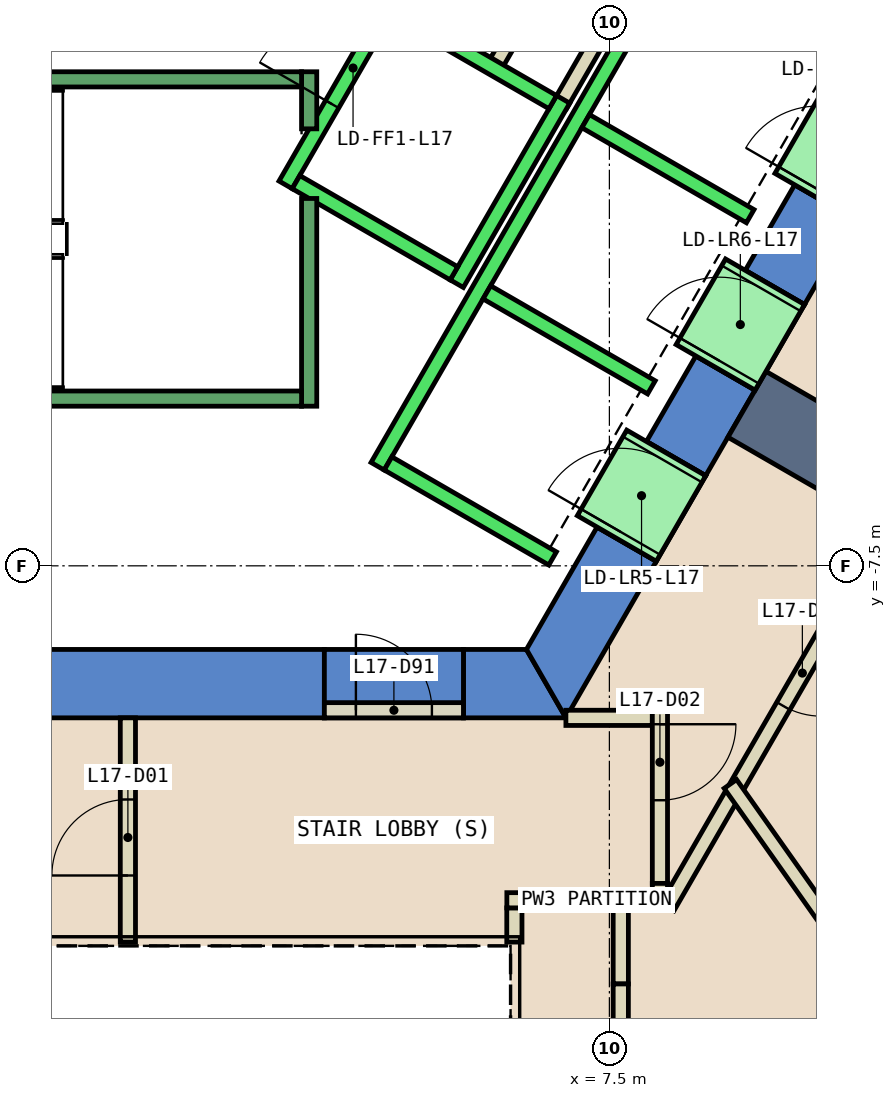
"""IFC4 building model, lengths in metres.
Left out: names, types, materials, properties, quantities, classifications, styles, units other than length and angle.
Written with IfcOpenShell. Run it as: python <this file> out.ifc"""

import sys

from ifc_helpers import new_model, si_unit, direction, frame, frame_2d, origin, place, context, subcontext, project, spatial, polyline, rectangle, outline, extrude, element, fill, save


model = new_model("IFC4")
c1 = context("Model", 3, precision=1e-05, world=origin(), true_north=direction((0.0, 1.0)))
c2 = subcontext(c1, "Body", "Model", "MODEL_VIEW")
j1 = project(units=[si_unit("LENGTHUNIT", "METRE"), si_unit("PLANEANGLEUNIT", "RADIAN")], contexts=[c1])
p1 = place(None, origin())
s1 = spatial("IfcSite", under=j1, at=p1, CompositionType="ELEMENT")
p2 = place(p1, origin())
s2 = spatial("IfcBuilding", under=s1, at=p2, CompositionType="ELEMENT")
p3 = place(p2, frame((0.0, 0.0, 81.2)))
s3 = spatial("IfcBuildingStorey", under=s2, at=p3, CompositionType="ELEMENT", Elevation=81.2)
p4 = place(p3, frame((0.0, 0.0, -0.6)))
e1 = element("IfcWall", 1, at=p4, inside=s3, PredefinedType="SHEAR", context=c2, shape_type="SweptSolid", body=[
    extrude(outline(polyline([(3.75, -9.5), (3.75, -8.6), (-6.409, -8.6), (-6.928, -9.5), (3.75, -9.5)])), origin(), (0.0, 0.0, 1.0), 5.4),
])
p5 = place(p3, frame((0.0, 0.0, -0.6)))
e2 = element("IfcWall", 2, at=p5, inside=s3, PredefinedType="SHEAR", context=c2, shape_type="SweptSolid", body=[
    extrude(outline(polyline([(5.58, -8.6), (5.58, -9.5), (6.928, -9.5), (6.409, -8.6), (5.58, -8.6)])), origin(), (0.0, 0.0, 1.0), 5.4),
])
p6 = place(p3, frame((0.0, 0.0, 3.6)))
e3 = element("IfcWall", 3, at=p6, inside=s3, PredefinedType="SHEAR", context=c2, shape_type="SweptSolid", body=[
    extrude(outline(polyline([(5.58, -9.5), (5.58, -8.6), (3.75, -8.6), (3.75, -9.5), (5.58, -9.5)])), origin(), (0.0, 0.0, 1.0), 1.2),
])
p7 = place(p3, frame((0.0, 0.0, -0.6)))
e4 = element("IfcWall", 4, at=p7, inside=s3, PredefinedType="SHEAR", context=c2, shape_type="SweptSolid", body=[
    extrude(outline(polyline([(8.117, -7.44), (7.338, -6.99), (6.409, -8.6), (6.928, -9.5), (8.117, -7.44)])), origin(), (0.0, 0.0, 1.0), 5.4),
])
p8 = place(p3, frame((0.0, 0.0, -0.6)))
e5 = element("IfcWall", 5, at=p8, inside=s3, PredefinedType="SHEAR", context=c2, shape_type="SweptSolid", body=[
    extrude(outline(polyline([(9.417, -5.189), (8.638, -4.739), (7.988, -5.864), (8.767, -6.314), (9.417, -5.189)])), origin(), (0.0, 0.0, 1.0), 5.4),
])
p9 = place(p3, frame((0.0, 0.0, -0.6)))
e6 = element("IfcWall", 6, at=p9, inside=s3, PredefinedType="SHEAR", context=c2, shape_type="SweptSolid", body=[
    extrude(outline(polyline([(10.717, -2.937), (9.938, -2.487), (9.288, -3.613), (10.067, -4.063), (10.717, -2.937)])), origin(), (0.0, 0.0, 1.0), 5.4),
])
p10 = place(p3, frame((0.0, 0.0, 3.6)))
e7 = element("IfcWall", 7, at=p10, inside=s3, PredefinedType="SHEAR", context=c2, shape_type="SweptSolid", body=[
    extrude(outline(polyline([(8.767, -6.314), (7.988, -5.864), (7.338, -6.99), (8.117, -7.44), (8.767, -6.314)])), origin(), (0.0, 0.0, 1.0), 1.2),
])
p11 = place(p3, frame((0.0, 0.0, 3.6)))
e8 = element("IfcWall", 8, at=p11, inside=s3, PredefinedType="SHEAR", context=c2, shape_type="SweptSolid", body=[
    extrude(outline(polyline([(10.067, -4.063), (9.288, -3.613), (8.638, -4.739), (9.417, -5.189), (10.067, -4.063)])), origin(), (0.0, 0.0, 1.0), 1.2),
])
p12 = place(p3, frame((0.0, 0.0, 3.6)))
e9 = element("IfcWall", 9, at=p12, inside=s3, PredefinedType="SHEAR", context=c2, shape_type="SweptSolid", body=[
    extrude(outline(polyline([(11.367, -1.811), (10.588, -1.361), (9.938, -2.487), (10.717, -2.937), (11.367, -1.811)])), origin(), (0.0, 0.0, 1.0), 1.2),
])
p13 = place(p3, frame((9.31, -5.375, 0.0), z_axis=(0.0, 0.0, 1.0), x_axis=(0.866022967049, -0.500004220526, 0.0)))
e10 = element("IfcWall", 10, at=p13, inside=s3, PredefinedType="SHEAR", context=c2, shape_type="SweptSolid", body=[
    extrude(rectangle(XDim=35.802, YDim=1.0, at=frame_2d((17.901, 0.0))), origin(), (0.0, 0.0, 1.0), 4.8),
])
p14 = place(p3, frame((6.826, 0.522, 0.0), z_axis=(0.0, 0.0, 1.0), x_axis=(-0.500016722714, -0.866015748706, 0.0)))
e11 = element("IfcWall", 11, at=p14, inside=s3, PredefinedType="PARTITIONING", context=c2, shape_type="SweptSolid", body=[
    extrude(rectangle(XDim=1.7, YDim=0.2, at=frame_2d((0.85, 0.0))), origin(), (0.0, 0.0, 1.0), 4.8),
])
p15 = place(p3, frame((8.192, 0.888, 0.0), z_axis=(0.0, 0.0, 1.0), x_axis=(-0.499940625693, -0.866059680843, 0.0)))
e12 = element("IfcWall", 12, at=p15, inside=s3, PredefinedType="PARTITIONING", context=c2, shape_type="SweptSolid", body=[
    extrude(rectangle(XDim=2.68, YDim=0.2, at=frame_2d((1.34, 0.0))), origin(), (0.0, 0.0, 1.0), 4.8),
])
p16 = place(p3, frame((-0.52, -1.0, 0.0), z_axis=(0.0, 0.0, 1.0), x_axis=(0.50011622646, 0.865958290007, 0.0)))
e13 = element("IfcWall", 13, at=p16, inside=s3, PredefinedType="PARTITIONING", context=c2, shape_type="SweptSolid", body=[
    extrude(rectangle(XDim=4.991, YDim=0.2, at=frame_2d((2.496, 0.0))), origin(), (0.0, 0.0, 1.0), 4.8),
])
p17 = place(p16, frame((1.945, 0.0, 0.0)))
e14 = element("IfcOpeningElement", 14, at=p17, cuts=e13, PredefinedType="OPENING", context=c2, shape_type="SweptSolid", body=[
    extrude(rectangle(XDim=1.0, YDim=2.1, at=frame_2d((0.5, 1.05))), frame((0.0, 0.11, 0.0), z_axis=(0.0, -1.0, 0.0), x_axis=(1.0, 0.0, 0.0)), (0.0, 0.0, 1.0), 0.22),
])
p18 = place(p3, frame((1.165, -12.45, 0.0), z_axis=(0.0, 0.0, 1.0), x_axis=(0.0, 1.0, 0.0)))
e15 = element("IfcWall", 15, at=p18, inside=s3, PredefinedType="PARTITIONING", context=c2, shape_type="SweptSolid", body=[
    extrude(rectangle(XDim=2.95, YDim=0.2, at=frame_2d((1.475, 0.0))), origin(), (0.0, 0.0, 1.0), 4.8),
])
p19 = place(p18, frame((0.876, 0.0, 0.0)))
e16 = element("IfcOpeningElement", 16, at=p19, cuts=e15, PredefinedType="OPENING", context=c2, shape_type="SweptSolid", body=[
    extrude(rectangle(XDim=1.0, YDim=2.1, at=frame_2d((0.5, 1.05))), frame((0.0, 0.11, 0.0), z_axis=(0.0, -1.0, 0.0), x_axis=(1.0, 0.0, 0.0)), (0.0, 0.0, 1.0), 0.22),
])
p20 = place(p3, frame((7.55, -11.9, 0.0), z_axis=(0.0, 0.0, 1.0), x_axis=(-1.0, 0.0, 0.0)))
e17 = element("IfcWall", 17, at=p20, inside=s3, PredefinedType="PARTITIONING", context=c2, shape_type="SweptSolid", body=[
    extrude(rectangle(XDim=0.44, YDim=0.2, at=frame_2d((0.22, 0.0))), origin(), (0.0, 0.0, 1.0), 2.4),
])
p21 = place(p3, frame((6.25, -12.0, 0.0), z_axis=(0.0, 0.0, 1.0), x_axis=(0.0, -1.0, 0.0)))
e18 = element("IfcWall", 18, at=p21, inside=s3, PredefinedType="PARTITIONING", context=c2, shape_type="SweptSolid", body=[
    extrude(rectangle(XDim=0.45, YDim=0.2, at=frame_2d((0.225, 0.0))), origin(), (0.0, 0.0, 1.0), 4.8),
])
p22 = place(p3, frame((6.928, -9.5, 0.0), z_axis=(0.0, 0.0, 1.0), x_axis=(1.0, 0.0, 0.0)))
e19 = element("IfcWall", 19, at=p22, inside=s3, PredefinedType="PARTITIONING", context=c2, shape_type="SweptSolid", body=[
    extrude(rectangle(XDim=1.137, YDim=0.2, at=frame_2d((0.568, 0.0))), origin(), (0.0, 0.0, 1.0), 4.8),
])
p23 = place(p3, frame((8.165, -9.4, 0.0), z_axis=(0.0, 0.0, 1.0), x_axis=(0.0, -1.0, 0.0)))
e20 = element("IfcWall", 20, at=p23, inside=s3, PredefinedType="PARTITIONING", context=c2, shape_type="SweptSolid", body=[
    extrude(rectangle(XDim=2.278, YDim=0.2, at=frame_2d((1.139, 0.0))), origin(), (0.0, 0.0, 1.0), 4.8),
])
p24 = place(p23, frame((0.184, 0.0, 0.0)))
e21 = element("IfcOpeningElement", 21, at=p24, cuts=e20, PredefinedType="OPENING", context=c2, shape_type="SweptSolid", body=[
    extrude(rectangle(XDim=1.0, YDim=2.1, at=frame_2d((0.5, 1.05))), frame((0.0, 0.11, 0.0), z_axis=(0.0, -1.0, 0.0), x_axis=(1.0, 0.0, 0.0)), (0.0, 0.0, 1.0), 0.22),
])
p25 = place(p3, frame((8.065, -11.9, 0.0), z_axis=(0.0, 0.0, 1.0), x_axis=(-1.0, 0.0, 0.0)))
e22 = element("IfcWall", 22, at=p25, inside=s3, PredefinedType="PARTITIONING", context=c2, shape_type="SweptSolid", body=[
    extrude(rectangle(XDim=0.315, YDim=0.2, at=frame_2d((0.157, 0.0))), origin(), (0.0, 0.0, 1.0), 2.4),
])
p26 = place(p3, frame((7.65, -11.8, 0.0), z_axis=(0.0, 0.0, 1.0), x_axis=(0.0, -1.0, 0.0)))
e23 = element("IfcWall", 23, at=p26, inside=s3, PredefinedType="PARTITIONING", context=c2, shape_type="SweptSolid", body=[
    extrude(rectangle(XDim=1.201, YDim=0.2, at=frame_2d((0.601, 0.0))), origin(), (0.0, 0.0, 1.0), 2.4),
])
p27 = place(p3, frame((9.15, -10.451, 0.0), z_axis=(0.0, 0.0, 1.0), x_axis=(-0.499619156193, -0.866245172434, 0.0)))
e24 = element("IfcWall", 24, at=p27, inside=s3, PredefinedType="PARTITIONING", context=c2, shape_type="SweptSolid", body=[
    extrude(rectangle(XDim=1.773, YDim=0.2, at=frame_2d((0.887, 0.0))), origin(), (0.0, 0.0, 1.0), 4.8),
])
p28 = place(p3, frame((10.89, -7.437, 0.0), z_axis=(0.0, 0.0, 1.0), x_axis=(-0.499979528911, -0.866037222451, 0.0)))
e25 = element("IfcWall", 25, at=p28, inside=s3, PredefinedType="PARTITIONING", context=c2, shape_type="SweptSolid", body=[
    extrude(rectangle(XDim=3.48, YDim=0.2, at=frame_2d((1.74, 0.0))), origin(), (0.0, 0.0, 1.0), 4.8),
])
p29 = place(p28, frame((1.202, 0.0, 0.0)))
e26 = element("IfcOpeningElement", 26, at=p29, cuts=e25, PredefinedType="OPENING", context=c2, shape_type="SweptSolid", body=[
    extrude(rectangle(XDim=1.0, YDim=2.1, at=frame_2d((0.5, 1.05))), frame((0.0, 0.11, 0.0), z_axis=(0.0, -1.0, 0.0), x_axis=(1.0, 0.0, 0.0)), (0.0, 0.0, 1.0), 0.22),
])
p30 = place(p3, frame((9.092, -10.37, 0.0), z_axis=(0.0, 0.0, 1.0), x_axis=(0.577082807178, -0.816685639435, 0.0)))
e27 = element("IfcWall", 27, at=p30, inside=s3, PredefinedType="PARTITIONING", context=c2, shape_type="SweptSolid", body=[
    extrude(rectangle(XDim=23.646, YDim=0.2, at=frame_2d((11.823, 0.0))), origin(), (0.0, 0.0, 1.0), 4.8),
])
p31 = place(p3, frame((3.75, -9.4, 0.0), z_axis=(0.0, 0.0, 1.0), x_axis=(1.0, 0.0, 0.0)))
e28 = element("IfcWall", 28, at=p31, inside=s3, PredefinedType="PARTITIONING", context=c2, shape_type="SweptSolid", body=[
    extrude(rectangle(XDim=1.83, YDim=0.2, at=frame_2d((0.915, 0.0))), origin(), (0.0, 0.0, 1.0), 2.4),
])
p32 = place(p31, frame((0.415, 0.0, 0.0)))
e29 = element("IfcOpeningElement", 29, at=p32, cuts=e28, PredefinedType="OPENING", context=c2, shape_type="SweptSolid", body=[
    extrude(rectangle(XDim=1.0, YDim=2.1, at=frame_2d((0.5, 1.05))), frame((0.0, 0.11, 0.0), z_axis=(0.0, -1.0, 0.0), x_axis=(1.0, 0.0, 0.0)), (0.0, 0.0, 1.0), 0.22),
])
p33 = place(p3, frame((7.11, -11.9, 0.0), z_axis=(0.0, 0.0, 1.0), x_axis=(-1.0, 0.0, 0.0)))
e30 = element("IfcWall", 30, at=p33, inside=s3, PredefinedType="PARTITIONING", context=c2, shape_type="SweptSolid", body=[
    extrude(rectangle(XDim=0.959, YDim=0.2, at=frame_2d((0.479, 0.0))), origin(), (0.0, 0.0, 1.0), 4.8),
])
p34 = place(p3, frame((8.165, -11.678, 0.0), z_axis=(0.0, 0.0, 1.0), x_axis=(0.0, -1.0, 0.0)))
e31 = element("IfcWall", 31, at=p34, inside=s3, PredefinedType="PARTITIONING", context=c2, shape_type="SweptSolid", body=[
    extrude(rectangle(XDim=0.322, YDim=0.2, at=frame_2d((0.161, 0.0))), origin(), (0.0, 0.0, 1.0), 2.4),
])
p35 = place(p3, frame((7.65, -13.001, 0.0), z_axis=(0.0, 0.0, 1.0), x_axis=(0.0, -1.0, 0.0)))
e32 = element("IfcWall", 32, at=p35, inside=s3, PredefinedType="PARTITIONING", context=c2, shape_type="SweptSolid", body=[
    extrude(rectangle(XDim=9.815, YDim=0.2, at=frame_2d((4.907, 0.0))), origin(), (0.0, 0.0, 1.0), 4.8),
])
p36 = place(p35, frame((7.362, 0.0, 0.0)))
e33 = element("IfcOpeningElement", 33, at=p36, cuts=e32, PredefinedType="OPENING", context=c2, shape_type="SweptSolid", body=[
    extrude(rectangle(XDim=1.0, YDim=2.1, at=frame_2d((0.5, 1.05))), frame((0.0, 0.11, 0.0), z_axis=(0.0, -1.0, 0.0), x_axis=(1.0, 0.0, 0.0)), (0.0, 0.0, 1.0), 0.22),
])
p37 = place(p3, frame((3.24, -2.488, 0.0), z_axis=(0.0, 0.0, 1.0), x_axis=(0.49994636267, 0.866056369097, 0.0)))
e34 = element("IfcWall", 34, at=p37, inside=s3, PredefinedType="STANDARD", context=c2, shape_type="SweptSolid", body=[
    extrude(rectangle(XDim=2.8, YDim=0.2, at=frame_2d((1.4, 0.0))), origin(), (0.0, 0.0, 1.0), 4.8),
])
p38 = place(p37, frame((1.225, 0.0, 0.0)))
e35 = element("IfcOpeningElement", 35, at=p38, cuts=e34, PredefinedType="OPENING", context=c2, shape_type="SweptSolid", body=[
    extrude(rectangle(XDim=1.1, YDim=2.1, at=frame_2d((0.55, 1.05))), frame((0.0, 0.11, 0.0), z_axis=(0.0, -1.0, 0.0), x_axis=(1.0, 0.0, 0.0)), (0.0, 0.0, 1.0), 0.22),
])
p39 = place(p3, frame((5.492, -3.788, 0.0), z_axis=(0.0, 0.0, 1.0), x_axis=(0.500011755427, 0.866018616679, 0.0)))
e36 = element("IfcWall", 36, at=p39, inside=s3, PredefinedType="STANDARD", context=c2, shape_type="SweptSolid", body=[
    extrude(rectangle(XDim=2.8, YDim=0.2, at=frame_2d((1.4, 0.0))), origin(), (0.0, 0.0, 1.0), 4.8),
])
p40 = place(p3, frame((3.377, -2.452, 0.0), z_axis=(0.0, 0.0, 1.0), x_axis=(0.865955154139, -0.50012165622, 0.0)))
e37 = element("IfcWall", 37, at=p40, inside=s3, PredefinedType="STANDARD", context=c2, shape_type="SweptSolid", body=[
    extrude(rectangle(XDim=2.4, YDim=0.2, at=frame_2d((1.2, 0.0))), origin(), (0.0, 0.0, 1.0), 4.8),
])
p41 = place(p3, frame((4.677, -0.2, 0.0), z_axis=(0.0, 0.0, 1.0), x_axis=(0.865973769406, -0.500089422704, 0.0)))
e38 = element("IfcWall", 38, at=p41, inside=s3, PredefinedType="STANDARD", context=c2, shape_type="SweptSolid", body=[
    extrude(rectangle(XDim=2.399, YDim=0.2, at=frame_2d((1.2, 0.0))), origin(), (0.0, 0.0, 1.0), 4.8),
])
p42 = place(p3, frame((4.451, -6.19, 0.0), z_axis=(0.0, 0.0, 1.0), x_axis=(0.50000090737, 0.866024879913, 0.0)))
e39 = element("IfcWall", 39, at=p42, inside=s3, PredefinedType="STANDARD", context=c2, shape_type="SweptSolid", body=[
    extrude(rectangle(XDim=10.6, YDim=0.2, at=frame_2d((5.3, 0.0))), origin(), (0.0, 0.0, 1.0), 4.8),
])
for number, where, z_axis, x_axis in (
    (40, (4.588, -6.153, 0.0), (0.0, 0.0, 1.0), (0.866, -0.5, 0.0)),
    (41, (5.888, -3.902, 0.0), (0.0, 0.0, 1.0), (0.866, -0.5, 0.0)),
    (42, (7.188, -1.65, 0.0), (0.0, 0.0, 1.0), (0.866, -0.5, 0.0)),
):
    element("IfcWall", number, at=place(p3, frame(where, z_axis=z_axis, x_axis=x_axis)), inside=s3, PredefinedType="STANDARD", context=c2, shape_type="SweptSolid", body=[
        extrude(rectangle(XDim=2.5, YDim=0.2, at=frame_2d((1.25, 0.0))), origin(), (0.0, 0.0, 1.0), 4.8),
    ])
p43 = place(p3, frame((7.598, -7.14, 0.0), z_axis=(0.0, 0.0, 1.0), x_axis=(0.500362116554, 0.865816234728, 0.0)))
e43 = element("IfcWall", 43, at=p43, inside=s3, PredefinedType="STANDARD", context=c2, shape_type="SweptSolid", body=[
    extrude(rectangle(XDim=1.299, YDim=1.2, at=frame_2d((0.65, 0.0))), origin(), (0.0, 0.0, 1.0), 2.4),
])
p44 = place(p43, frame((0.1, 0.0, 0.0)))
e44 = element("IfcOpeningElement", 44, at=p44, cuts=e43, PredefinedType="OPENING", context=c2, shape_type="SweptSolid", body=[
    extrude(rectangle(XDim=1.1, YDim=2.3, at=frame_2d((0.55, 1.15))), frame((0.0, 0.61, 0.0), z_axis=(0.0, -1.0, 0.0), x_axis=(1.0, 0.0, 0.0)), (0.0, 0.0, 1.0), 1.22),
])
p45 = place(p3, frame((8.898, -4.889, 0.0), z_axis=(0.0, 0.0, 1.0), x_axis=(0.500036693733, 0.866004217611, 0.0)))
e45 = element("IfcWall", 45, at=p45, inside=s3, PredefinedType="STANDARD", context=c2, shape_type="SweptSolid", body=[
    extrude(rectangle(XDim=1.3, YDim=1.2, at=frame_2d((0.65, 0.0))), origin(), (0.0, 0.0, 1.0), 2.4),
])
p46 = place(p45, frame((0.1, 0.0, 0.0)))
e46 = element("IfcOpeningElement", 46, at=p46, cuts=e45, PredefinedType="OPENING", context=c2, shape_type="SweptSolid", body=[
    extrude(rectangle(XDim=1.1, YDim=2.3, at=frame_2d((0.55, 1.15))), frame((0.0, 0.61, 0.0), z_axis=(0.0, -1.0, 0.0), x_axis=(1.0, 0.0, 0.0)), (0.0, 0.0, 1.0), 1.22),
])
p47 = place(p3, frame((10.198, -2.637, 0.0), z_axis=(0.0, 0.0, 1.0), x_axis=(0.49989585183, 0.866085525409, 0.0)))
e47 = element("IfcWall", 47, at=p47, inside=s3, PredefinedType="STANDARD", context=c2, shape_type="SweptSolid", body=[
    extrude(rectangle(XDim=1.3, YDim=1.2, at=frame_2d((0.65, 0.0))), origin(), (0.0, 0.0, 1.0), 2.4),
])
p48 = place(p47, frame((0.1, 0.0, 0.0)))
e48 = element("IfcOpeningElement", 48, at=p48, cuts=e47, PredefinedType="OPENING", context=c2, shape_type="SweptSolid", body=[
    extrude(rectangle(XDim=1.1, YDim=2.3, at=frame_2d((0.55, 1.15))), frame((0.0, 0.61, 0.0), z_axis=(0.0, -1.0, 0.0), x_axis=(1.0, 0.0, 0.0)), (0.0, 0.0, 1.0), 1.22),
])
p49 = place(p3, frame((3.55, -2.667, 0.0), z_axis=(0.0, 0.0, 1.0), x_axis=(0.0, -1.0, 0.0)))
e49 = element("IfcWall", 49, at=p49, inside=s3, PredefinedType="STANDARD", context=c2, shape_type="SweptSolid", body=[
    extrude(rectangle(XDim=2.733, YDim=0.2, at=frame_2d((1.366, 0.0))), origin(), (0.0, 0.0, 1.0), 4.8),
])
p50 = place(p3, frame((3.55, -1.0, 0.0), z_axis=(0.0, 0.0, 1.0), x_axis=(0.0, -1.0, 0.0)))
e50 = element("IfcWall", 50, at=p50, inside=s3, PredefinedType="STANDARD", context=c2, shape_type="SweptSolid", body=[
    extrude(rectangle(XDim=0.751, YDim=0.2, at=frame_2d((0.375, 0.0))), origin(), (0.0, 0.0, 1.0), 4.8),
])
p51 = place(p3, frame((-3.45, -1.1, 0.0), z_axis=(0.0, 0.0, 1.0), x_axis=(1.0, 0.0, 0.0)))
e51 = element("IfcWall", 51, at=p51, inside=s3, PredefinedType="STANDARD", context=c2, shape_type="SweptSolid", body=[
    extrude(rectangle(XDim=6.9, YDim=0.2, at=frame_2d((3.45, 0.0))), origin(), (0.0, 0.0, 1.0), 4.8),
])
p52 = place(p51, frame((0.45, 0.0, 0.0)))
e52 = element("IfcOpeningElement", 52, at=p52, cuts=e51, PredefinedType="OPENING", context=c2, shape_type="SweptSolid", body=[
    extrude(rectangle(XDim=1.1, YDim=2.2, at=frame_2d((0.55, 1.1))), frame((0.0, 0.11, 0.0), z_axis=(0.0, -1.0, 0.0), x_axis=(1.0, 0.0, 0.0)), (0.0, 0.0, 1.0), 0.22),
])
p53 = place(p3, frame((-3.45, -5.3, 0.0), z_axis=(0.0, 0.0, 1.0), x_axis=(1.0, 0.0, 0.0)))
e53 = element("IfcWall", 53, at=p53, inside=s3, PredefinedType="STANDARD", context=c2, shape_type="SweptSolid", body=[
    extrude(rectangle(XDim=6.9, YDim=0.2, at=frame_2d((3.45, 0.0))), origin(), (0.0, 0.0, 1.0), 4.8),
])
p54 = place(p19, origin())
e54 = element("IfcDoor", 54, at=p54, inside=s3, OperationType="SINGLE_SWING_LEFT", PredefinedType="DOOR", context=c2, shape_type="SweptSolid", body=[
    extrude(rectangle(XDim=1.0, YDim=2.1, at=frame_2d((0.5, 1.05))), frame((0.0, 0.025, 0.0), z_axis=(0.0, -1.0, 0.0), x_axis=(1.0, 0.0, 0.0)), (0.0, 0.0, 1.0), 0.05),
])
fill(e16, e54)
p55 = place(p24, origin())
e55 = element("IfcDoor", 55, at=p55, inside=s3, OperationType="SINGLE_SWING_RIGHT", PredefinedType="DOOR", context=c2, shape_type="SweptSolid", body=[
    extrude(rectangle(XDim=1.0, YDim=2.1, at=frame_2d((0.5, 1.05))), frame((0.0, 0.025, 0.0), z_axis=(0.0, -1.0, 0.0), x_axis=(1.0, 0.0, 0.0)), (0.0, 0.0, 1.0), 0.05),
])
fill(e21, e55)
p56 = place(p29, origin())
e56 = element("IfcDoor", 56, at=p56, inside=s3, OperationType="SINGLE_SWING_LEFT", PredefinedType="DOOR", context=c2, shape_type="SweptSolid", body=[
    extrude(rectangle(XDim=1.0, YDim=2.1, at=frame_2d((0.5, 1.05))), frame((0.0, 0.025, 0.0), z_axis=(0.0, -1.0, 0.0), x_axis=(1.0, 0.0, 0.0)), (0.0, 0.0, 1.0), 0.05),
])
fill(e26, e56)
p57 = place(p32, origin())
e57 = element("IfcDoor", 57, at=p57, inside=s3, OperationType="SINGLE_SWING_LEFT", PredefinedType="DOOR", context=c2, shape_type="SweptSolid", body=[
    extrude(rectangle(XDim=1.0, YDim=2.1, at=frame_2d((0.5, 1.05))), frame((0.0, 0.025, 0.0), z_axis=(0.0, -1.0, 0.0), x_axis=(1.0, 0.0, 0.0)), (0.0, 0.0, 1.0), 0.05),
])
fill(e29, e57)
p58 = place(p44, origin())
e58 = element("IfcDoor", 58, at=p58, inside=s3, OperationType="SLIDING_TO_LEFT", PredefinedType="DOOR", context=c2, shape_type="SweptSolid", body=[
    extrude(rectangle(XDim=1.1, YDim=2.3, at=frame_2d((0.55, 1.15))), frame((0.0, 0.025, 0.0), z_axis=(0.0, -1.0, 0.0), x_axis=(1.0, 0.0, 0.0)), (0.0, 0.0, 1.0), 0.05),
])
fill(e44, e58)
p59 = place(p46, origin())
e59 = element("IfcDoor", 59, at=p59, inside=s3, OperationType="SLIDING_TO_LEFT", PredefinedType="DOOR", context=c2, shape_type="SweptSolid", body=[
    extrude(rectangle(XDim=1.1, YDim=2.3, at=frame_2d((0.55, 1.15))), frame((0.0, 0.025, 0.0), z_axis=(0.0, -1.0, 0.0), x_axis=(1.0, 0.0, 0.0)), (0.0, 0.0, 1.0), 0.05),
])
fill(e46, e59)
p60 = place(p38, origin())
e60 = element("IfcDoor", 60, at=p60, inside=s3, OperationType="SLIDING_TO_LEFT", PredefinedType="DOOR", context=c2, shape_type="SweptSolid", body=[
    extrude(rectangle(XDim=1.1, YDim=2.1, at=frame_2d((0.55, 1.05))), frame((0.0, 0.025, 0.0), z_axis=(0.0, -1.0, 0.0), x_axis=(1.0, 0.0, 0.0)), (0.0, 0.0, 1.0), 0.05),
])
fill(e35, e60)
save(model, sys.argv[1])
